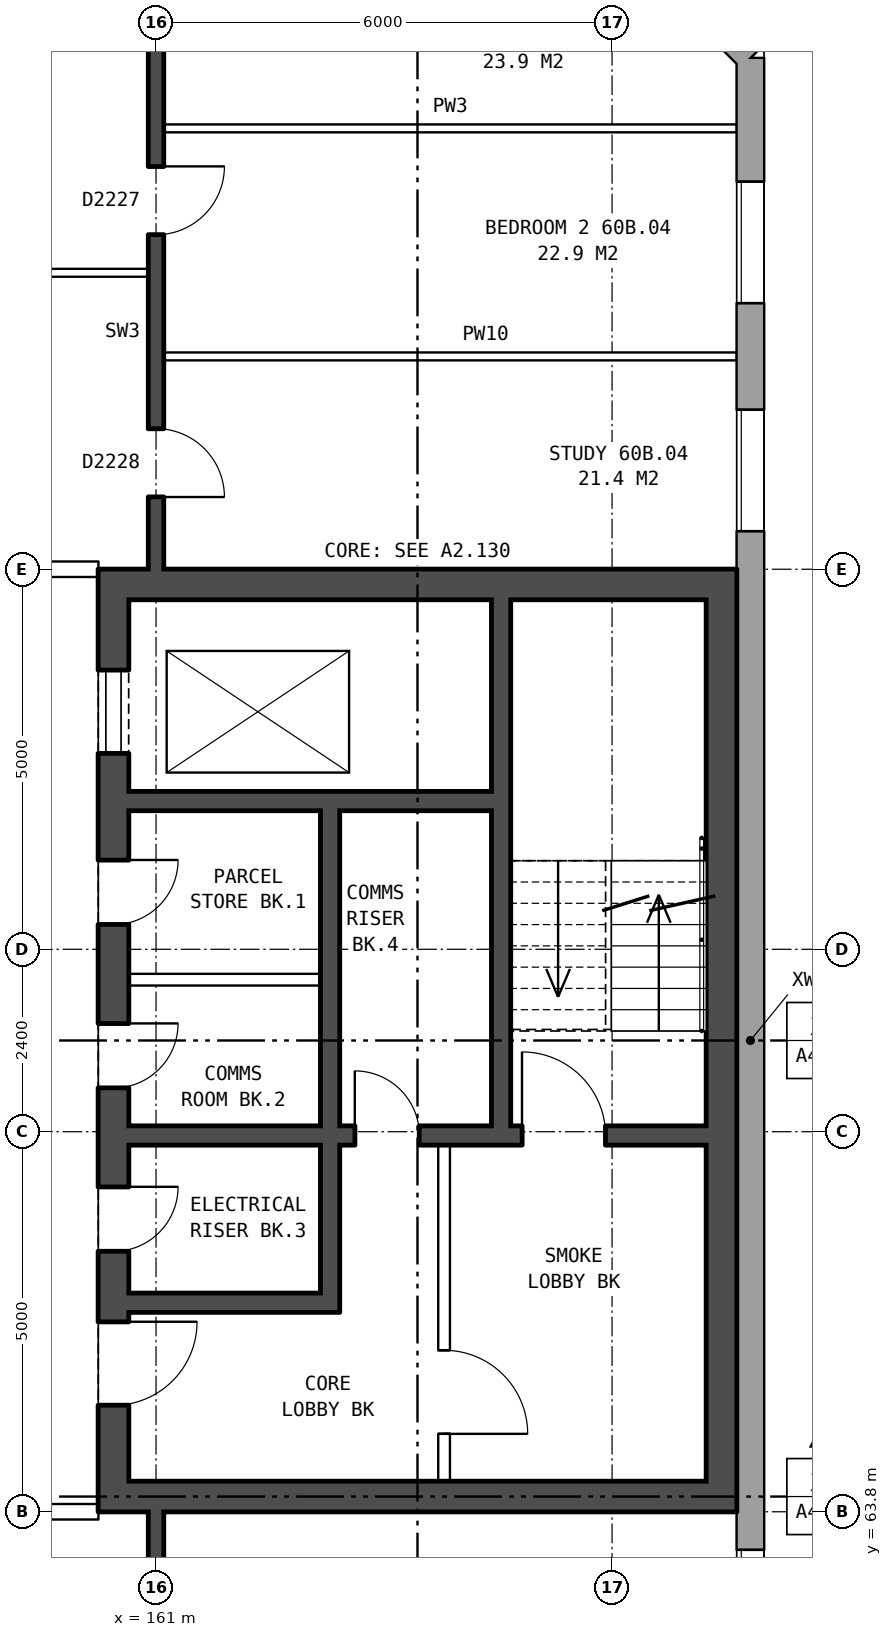
"""IFC4 building model, lengths in metres.
Left out: names, types, materials, properties, quantities, classifications, styles, units other than length and angle.
Written with IfcOpenShell. Run it as: python <this file> out.ifc"""

import sys

from ifc_helpers import new_model, si_unit, direction, frame, frame_2d, origin, place, context, subcontext, project, spatial, rectangle, extrude, element, fill, save


model = new_model("IFC4")
c1 = context("Model", 3, precision=1e-05, world=origin(), true_north=direction((0.0, 1.0)))
c2 = subcontext(c1, "Body", "Model", "MODEL_VIEW")
j1 = project(units=[si_unit("LENGTHUNIT", "METRE"), si_unit("PLANEANGLEUNIT", "RADIAN")], contexts=[c1])
p1 = place(None, origin())
s1 = spatial("IfcSite", under=j1, at=p1, CompositionType="ELEMENT")
p2 = place(p1, origin())
s2 = spatial("IfcBuilding", under=s1, at=p2, CompositionType="ELEMENT")
p3 = place(p2, frame((0.0, 0.0, 212.1)))
s3 = spatial("IfcBuildingStorey", under=s2, at=p3, CompositionType="ELEMENT", Elevation=212.1)
p4 = place(p3, frame((168.82, 57.075, 0.0), z_axis=(0.0, 0.0, 1.0), x_axis=(0.0, 1.0, 0.0)))
e1 = element("IfcWall", 1, at=p4, inside=s3, PredefinedType="STANDARD", context=c2, shape_type="SweptSolid", body=[
    extrude(rectangle(XDim=25.851, YDim=0.36, at=frame_2d((12.925, 0.0))), origin(), (0.0, 0.0, 1.0), 2.85),
])
p5 = place(p4, frame((1.625, 0.0, 0.8)))
e2 = element("IfcOpeningElement", 2, at=p5, cuts=e1, PredefinedType="OPENING", context=c2, shape_type="SweptSolid", body=[
    extrude(rectangle(XDim=1.6, YDim=1.8, at=frame_2d((0.8, 0.9))), frame((0.0, 0.19, 0.0), z_axis=(0.0, -1.0, 0.0), x_axis=(1.0, 0.0, 0.0)), (0.0, 0.0, 1.0), 0.38),
])
p6 = place(p4, frame((4.625, 0.0, 0.8)))
e3 = element("IfcOpeningElement", 3, at=p6, cuts=e1, PredefinedType="OPENING", context=c2, shape_type="SweptSolid", body=[
    extrude(rectangle(XDim=1.6, YDim=1.8, at=frame_2d((0.8, 0.9))), frame((0.0, 0.19, 0.0), z_axis=(0.0, -1.0, 0.0), x_axis=(1.0, 0.0, 0.0)), (0.0, 0.0, 1.0), 0.38),
])
p7 = place(p4, frame((19.625, 0.0, 0.8)))
e4 = element("IfcOpeningElement", 4, at=p7, cuts=e1, PredefinedType="OPENING", context=c2, shape_type="SweptSolid", body=[
    extrude(rectangle(XDim=1.6, YDim=1.8, at=frame_2d((0.8, 0.9))), frame((0.0, 0.19, 0.0), z_axis=(0.0, -1.0, 0.0), x_axis=(1.0, 0.0, 0.0)), (0.0, 0.0, 1.0), 0.38),
])
p8 = place(p4, frame((22.625, 0.0, 0.8)))
e5 = element("IfcOpeningElement", 5, at=p8, cuts=e1, PredefinedType="OPENING", context=c2, shape_type="SweptSolid", body=[
    extrude(rectangle(XDim=1.6, YDim=1.8, at=frame_2d((0.8, 0.9))), frame((0.0, 0.19, 0.0), z_axis=(0.0, -1.0, 0.0), x_axis=(1.0, 0.0, 0.0)), (0.0, 0.0, 1.0), 0.38),
])
p9 = place(p3, frame((168.82, 82.925, 0.0), z_axis=(0.0, 0.0, 1.0), x_axis=(-0.707106781187, 0.707106781187, 0.0)))
e6 = element("IfcWall", 6, at=p9, inside=s3, PredefinedType="STANDARD", context=c2, shape_type="SweptSolid", body=[
    extrude(rectangle(XDim=4.094, YDim=0.36, at=frame_2d((2.047, 0.0))), origin(), (0.0, 0.0, 1.0), 2.85),
])
p10 = place(p9, frame((1.247, 0.0, 0.8)))
e7 = element("IfcOpeningElement", 7, at=p10, cuts=e6, PredefinedType="OPENING", context=c2, shape_type="SweptSolid", body=[
    extrude(rectangle(XDim=1.6, YDim=1.8, at=frame_2d((0.8, 0.9))), frame((0.0, 0.19, 0.0), z_axis=(0.0, -1.0, 0.0), x_axis=(1.0, 0.0, 0.0)), (0.0, 0.0, 1.0), 0.38),
])
p11 = place(p3, frame((160.44, 76.2, 0.0), z_axis=(0.0, 0.0, 1.0), x_axis=(0.0, -1.0, 0.0)))
e8 = element("IfcWall", 8, at=p11, inside=s3, PredefinedType="SHEAR", context=c2, shape_type="SweptSolid", body=[
    extrude(rectangle(XDim=12.4, YDim=0.4, at=frame_2d((6.2, 0.0))), origin(), (0.0, 0.0, 1.0), 2.85),
])
p12 = place(p11, frame((1.325, 0.0, 0.0)))
e9 = element("IfcOpeningElement", 9, at=p12, cuts=e8, PredefinedType="OPENING", context=c2, shape_type="SweptSolid", body=[
    extrude(rectangle(XDim=1.1, YDim=2.1, at=frame_2d((0.55, 1.05))), frame((0.0, 0.21, 0.0), z_axis=(0.0, -1.0, 0.0), x_axis=(1.0, 0.0, 0.0)), (0.0, 0.0, 1.0), 0.42),
])
p13 = place(p11, frame((3.825, 0.0, 0.0)))
e10 = element("IfcOpeningElement", 10, at=p13, cuts=e8, PredefinedType="OPENING", context=c2, shape_type="SweptSolid", body=[
    extrude(rectangle(XDim=0.85, YDim=2.1, at=frame_2d((0.425, 1.05))), frame((0.0, 0.21, 0.0), z_axis=(0.0, -1.0, 0.0), x_axis=(1.0, 0.0, 0.0)), (0.0, 0.0, 1.0), 0.42),
])
p14 = place(p11, frame((5.975, 0.0, 0.0)))
e11 = element("IfcOpeningElement", 11, at=p14, cuts=e8, PredefinedType="OPENING", context=c2, shape_type="SweptSolid", body=[
    extrude(rectangle(XDim=0.85, YDim=2.1, at=frame_2d((0.425, 1.05))), frame((0.0, 0.21, 0.0), z_axis=(0.0, -1.0, 0.0), x_axis=(1.0, 0.0, 0.0)), (0.0, 0.0, 1.0), 0.42),
])
p15 = place(p11, frame((9.9, 0.0, 0.0)))
e12 = element("IfcOpeningElement", 12, at=p15, cuts=e8, PredefinedType="OPENING", context=c2, shape_type="SweptSolid", body=[
    extrude(rectangle(XDim=1.1, YDim=2.1, at=frame_2d((0.55, 1.05))), frame((0.0, 0.21, 0.0), z_axis=(0.0, -1.0, 0.0), x_axis=(1.0, 0.0, 0.0)), (0.0, 0.0, 1.0), 0.42),
])
p16 = place(p11, frame((8.125, 0.0, 0.0)))
e13 = element("IfcOpeningElement", 13, at=p16, cuts=e8, PredefinedType="OPENING", context=c2, shape_type="SweptSolid", body=[
    extrude(rectangle(XDim=0.85, YDim=2.1, at=frame_2d((0.425, 1.05))), frame((0.0, 0.21, 0.0), z_axis=(0.0, -1.0, 0.0), x_axis=(1.0, 0.0, 0.0)), (0.0, 0.0, 1.0), 0.42),
])
p17 = place(p3, frame((168.44, 76.2, 0.0), z_axis=(0.0, 0.0, 1.0), x_axis=(0.0, -1.0, 0.0)))
e14 = element("IfcWall", 14, at=p17, inside=s3, PredefinedType="SHEAR", context=c2, shape_type="SweptSolid", body=[
    extrude(rectangle(XDim=12.4, YDim=0.4, at=frame_2d((6.2, 0.0))), origin(), (0.0, 0.0, 1.0), 2.85),
])
for number, where, z_axis, x_axis in (
    (15, (160.64, 76.0, 0.0), (0.0, 0.0, 1.0), (1.0, 0.0, 0.0)),
    (16, (160.64, 64.0, 0.0), (0.0, 0.0, 1.0), (1.0, 0.0, 0.0)),
):
    element("IfcWall", number, at=place(p3, frame(where, z_axis=z_axis, x_axis=x_axis)), inside=s3, PredefinedType="SHEAR", context=c2, shape_type="SweptSolid", body=[
        extrude(rectangle(XDim=7.6, YDim=0.4, at=frame_2d((3.8, 0.0))), origin(), (0.0, 0.0, 1.0), 2.85),
    ])
p18 = place(p3, frame((160.64, 73.15, 0.0), z_axis=(0.0, 0.0, 1.0), x_axis=(1.0, 0.0, 0.0)))
e17 = element("IfcWall", 17, at=p18, inside=s3, PredefinedType="SHEAR", context=c2, shape_type="SweptSolid", body=[
    extrude(rectangle(XDim=4.775, YDim=0.25, at=frame_2d((2.388, 0.0))), origin(), (0.0, 0.0, 1.0), 2.85),
])
p19 = place(p3, frame((160.64, 70.8, 0.0), z_axis=(0.0, 0.0, 1.0), x_axis=(1.0, 0.0, 0.0)))
e18 = element("IfcWall", 18, at=p19, inside=s3, PredefinedType="PARTITIONING", context=c2, shape_type="SweptSolid", body=[
    extrude(rectangle(XDim=2.525, YDim=0.15, at=frame_2d((1.263, 0.0))), origin(), (0.0, 0.0, 1.0), 2.85),
])
p20 = place(p3, frame((160.64, 68.75, 0.0), z_axis=(0.0, 0.0, 1.0), x_axis=(1.0, 0.0, 0.0)))
e19 = element("IfcWall", 19, at=p20, inside=s3, PredefinedType="SHEAR", context=c2, shape_type="SweptSolid", body=[
    extrude(rectangle(XDim=7.6, YDim=0.25, at=frame_2d((3.8, 0.0))), origin(), (0.0, 0.0, 1.0), 2.85),
])
p21 = place(p20, frame((5.175, 0.0, 0.0)))
e20 = element("IfcOpeningElement", 20, at=p21, cuts=e19, PredefinedType="OPENING", context=c2, shape_type="SweptSolid", body=[
    extrude(rectangle(XDim=1.1, YDim=2.1, at=frame_2d((0.55, 1.05))), frame((0.0, 0.135, 0.0), z_axis=(0.0, -1.0, 0.0), x_axis=(1.0, 0.0, 0.0)), (0.0, 0.0, 1.0), 0.27),
])
p22 = place(p20, frame((2.975, 0.0, 0.0)))
e21 = element("IfcOpeningElement", 21, at=p22, cuts=e19, PredefinedType="OPENING", context=c2, shape_type="SweptSolid", body=[
    extrude(rectangle(XDim=0.85, YDim=2.1, at=frame_2d((0.425, 1.05))), frame((0.0, 0.135, 0.0), z_axis=(0.0, -1.0, 0.0), x_axis=(1.0, 0.0, 0.0)), (0.0, 0.0, 1.0), 0.27),
])
p23 = place(p3, frame((160.64, 66.55, 0.0), z_axis=(0.0, 0.0, 1.0), x_axis=(1.0, 0.0, 0.0)))
e22 = element("IfcWall", 22, at=p23, inside=s3, PredefinedType="SHEAR", context=c2, shape_type="SweptSolid", body=[
    extrude(rectangle(XDim=2.525, YDim=0.25, at=frame_2d((1.263, 0.0))), origin(), (0.0, 0.0, 1.0), 2.85),
])
p24 = place(p3, frame((163.29, 73.025, 0.0), z_axis=(0.0, 0.0, 1.0), x_axis=(0.0, -1.0, 0.0)))
e23 = element("IfcWall", 23, at=p24, inside=s3, PredefinedType="SHEAR", context=c2, shape_type="SweptSolid", body=[
    extrude(rectangle(XDim=4.15, YDim=0.25, at=frame_2d((2.075, 0.0))), origin(), (0.0, 0.0, 1.0), 2.85),
])
p25 = place(p3, frame((163.29, 68.625, 0.0), z_axis=(0.0, 0.0, 1.0), x_axis=(0.0, -1.0, 0.0)))
e24 = element("IfcWall", 24, at=p25, inside=s3, PredefinedType="SHEAR", context=c2, shape_type="SweptSolid", body=[
    extrude(rectangle(XDim=2.2, YDim=0.25, at=frame_2d((1.1, 0.0))), origin(), (0.0, 0.0, 1.0), 2.85),
])
p26 = place(p3, frame((164.79, 68.625, 0.0), z_axis=(0.0, 0.0, 1.0), x_axis=(0.0, -1.0, 0.0)))
e25 = element("IfcWall", 25, at=p26, inside=s3, PredefinedType="PARTITIONING", context=c2, shape_type="SweptSolid", body=[
    extrude(rectangle(XDim=4.425, YDim=0.15, at=frame_2d((2.212, 0.0))), origin(), (0.0, 0.0, 1.0), 2.85),
])
p27 = place(p26, frame((2.7, 0.0, 0.0)))
e26 = element("IfcOpeningElement", 26, at=p27, cuts=e25, PredefinedType="OPENING", context=c2, shape_type="SweptSolid", body=[
    extrude(rectangle(XDim=1.1, YDim=2.1, at=frame_2d((0.55, 1.05))), frame((0.0, 0.085, 0.0), z_axis=(0.0, -1.0, 0.0), x_axis=(1.0, 0.0, 0.0)), (0.0, 0.0, 1.0), 0.17),
])
p28 = place(p3, frame((165.54, 75.8, 0.0), z_axis=(0.0, 0.0, 1.0), x_axis=(0.0, -1.0, 0.0)))
e27 = element("IfcWall", 27, at=p28, inside=s3, PredefinedType="SHEAR", context=c2, shape_type="SweptSolid", body=[
    extrude(rectangle(XDim=6.925, YDim=0.25, at=frame_2d((3.462, 0.0))), origin(), (0.0, 0.0, 1.0), 2.85),
])
p29 = place(p3, frame((157.24, 63.8, 0.0), z_axis=(0.0, 0.0, 1.0), x_axis=(1.0, 0.0, 0.0)))
e28 = element("IfcWall", 28, at=p29, inside=s3, PredefinedType="PARTITIONING", context=c2, shape_type="SweptSolid", body=[
    extrude(rectangle(XDim=3.0, YDim=0.2, at=frame_2d((1.5, 0.0))), origin(), (0.0, 0.0, 1.0), 2.85),
])
p30 = place(p29, frame((1.0, 0.0, 0.0)))
e29 = element("IfcOpeningElement", 29, at=p30, cuts=e28, PredefinedType="OPENING", context=c2, shape_type="SweptSolid", body=[
    extrude(rectangle(XDim=1.0, YDim=2.1, at=frame_2d((0.5, 1.05))), frame((0.0, 0.11, 0.0), z_axis=(0.0, -1.0, 0.0), x_axis=(1.0, 0.0, 0.0)), (0.0, 0.0, 1.0), 0.22),
])
p31 = place(p3, frame((157.24, 76.2, 0.0), z_axis=(0.0, 0.0, 1.0), x_axis=(1.0, 0.0, 0.0)))
e30 = element("IfcWall", 30, at=p31, inside=s3, PredefinedType="PARTITIONING", context=c2, shape_type="SweptSolid", body=[
    extrude(rectangle(XDim=3.0, YDim=0.2, at=frame_2d((1.5, 0.0))), origin(), (0.0, 0.0, 1.0), 2.85),
])
p32 = place(p31, frame((1.0, 0.0, 0.0)))
e31 = element("IfcOpeningElement", 31, at=p32, cuts=e30, PredefinedType="OPENING", context=c2, shape_type="SweptSolid", body=[
    extrude(rectangle(XDim=1.0, YDim=2.1, at=frame_2d((0.5, 1.05))), frame((0.0, 0.11, 0.0), z_axis=(0.0, -1.0, 0.0), x_axis=(1.0, 0.0, 0.0)), (0.0, 0.0, 1.0), 0.22),
])
p33 = place(p3, frame((161.1, 79.0, 0.0), z_axis=(0.0, 0.0, 1.0), x_axis=(1.0, 0.0, 0.0)))
e32 = element("IfcWall", 32, at=p33, inside=s3, PredefinedType="PARTITIONING", context=c2, shape_type="SweptSolid", body=[
    extrude(rectangle(XDim=7.54, YDim=0.1, at=frame_2d((3.77, 0.0))), origin(), (0.0, 0.0, 1.0), 2.85),
])
p34 = place(p3, frame((155.1, 80.1, 0.0), z_axis=(0.0, 0.0, 1.0), x_axis=(1.0, 0.0, 0.0)))
e33 = element("IfcWall", 33, at=p34, inside=s3, PredefinedType="PARTITIONING", context=c2, shape_type="SweptSolid", body=[
    extrude(rectangle(XDim=5.8, YDim=0.1, at=frame_2d((2.9, 0.0))), origin(), (0.0, 0.0, 1.0), 2.85),
])
p35 = place(p34, frame((3.6, 0.0, 0.0)))
e34 = element("IfcOpeningElement", 34, at=p35, cuts=e33, PredefinedType="OPENING", context=c2, shape_type="SweptSolid", body=[
    extrude(rectangle(XDim=0.9, YDim=2.1, at=frame_2d((0.45, 1.05))), frame((0.0, 0.06, 0.0), z_axis=(0.0, -1.0, 0.0), x_axis=(1.0, 0.0, 0.0)), (0.0, 0.0, 1.0), 0.12),
])
p36 = place(p34, frame((0.7, 0.0, 0.0)))
e35 = element("IfcOpeningElement", 35, at=p36, cuts=e33, PredefinedType="OPENING", context=c2, shape_type="SweptSolid", body=[
    extrude(rectangle(XDim=0.9, YDim=2.1, at=frame_2d((0.45, 1.05))), frame((0.0, 0.06, 0.0), z_axis=(0.0, -1.0, 0.0), x_axis=(1.0, 0.0, 0.0)), (0.0, 0.0, 1.0), 0.12),
])
p37 = place(p3, frame((161.1, 82.0, 0.0), z_axis=(0.0, 0.0, 1.0), x_axis=(1.0, 0.0, 0.0)))
e36 = element("IfcWall", 36, at=p37, inside=s3, PredefinedType="PARTITIONING", context=c2, shape_type="SweptSolid", body=[
    extrude(rectangle(XDim=7.54, YDim=0.1, at=frame_2d((3.77, 0.0))), origin(), (0.0, 0.0, 1.0), 2.85),
])
p38 = place(p3, frame((161.0, 54.36, 0.0), z_axis=(0.0, 0.0, 1.0), x_axis=(0.0, 1.0, 0.0)))
e37 = element("IfcWall", 37, at=p38, inside=s3, PredefinedType="SOLIDWALL", context=c2, shape_type="SweptSolid", body=[
    extrude(rectangle(XDim=9.44, YDim=0.2, at=frame_2d((4.72, 0.0))), origin(), (0.0, 0.0, 1.0), 2.85),
])
p39 = place(p38, frame((1.37, 0.0, 0.0)))
e38 = element("IfcOpeningElement", 38, at=p39, cuts=e37, PredefinedType="OPENING", context=c2, shape_type="SweptSolid", body=[
    extrude(rectangle(XDim=0.9, YDim=2.1, at=frame_2d((0.45, 1.05))), frame((0.0, 0.11, 0.0), z_axis=(0.0, -1.0, 0.0), x_axis=(1.0, 0.0, 0.0)), (0.0, 0.0, 1.0), 0.22),
])
p40 = place(p38, frame((4.29, 0.0, 0.0)))
e39 = element("IfcOpeningElement", 39, at=p40, cuts=e37, PredefinedType="OPENING", context=c2, shape_type="SweptSolid", body=[
    extrude(rectangle(XDim=0.9, YDim=2.1, at=frame_2d((0.45, 1.05))), frame((0.0, 0.11, 0.0), z_axis=(0.0, -1.0, 0.0), x_axis=(1.0, 0.0, 0.0)), (0.0, 0.0, 1.0), 0.22),
])
p41 = place(p38, frame((7.59, 0.0, 0.0)))
e40 = element("IfcOpeningElement", 40, at=p41, cuts=e37, PredefinedType="OPENING", context=c2, shape_type="SweptSolid", body=[
    extrude(rectangle(XDim=0.9, YDim=2.1, at=frame_2d((0.45, 1.05))), frame((0.0, 0.11, 0.0), z_axis=(0.0, -1.0, 0.0), x_axis=(1.0, 0.0, 0.0)), (0.0, 0.0, 1.0), 0.22),
])
p42 = place(p3, frame((161.0, 76.2, 0.0), z_axis=(0.0, 0.0, 1.0), x_axis=(0.0, 1.0, 0.0)))
e41 = element("IfcWall", 41, at=p42, inside=s3, PredefinedType="SOLIDWALL", context=c2, shape_type="SweptSolid", body=[
    extrude(rectangle(XDim=9.44, YDim=0.2, at=frame_2d((4.72, 0.0))), origin(), (0.0, 0.0, 1.0), 2.85),
])
p43 = place(p42, frame((7.17, 0.0, 0.0)))
e42 = element("IfcOpeningElement", 42, at=p43, cuts=e41, PredefinedType="OPENING", context=c2, shape_type="SweptSolid", body=[
    extrude(rectangle(XDim=0.9, YDim=2.1, at=frame_2d((0.45, 1.05))), frame((0.0, 0.11, 0.0), z_axis=(0.0, -1.0, 0.0), x_axis=(1.0, 0.0, 0.0)), (0.0, 0.0, 1.0), 0.22),
])
p44 = place(p42, frame((4.4, 0.0, 0.0)))
e43 = element("IfcOpeningElement", 43, at=p44, cuts=e41, PredefinedType="OPENING", context=c2, shape_type="SweptSolid", body=[
    extrude(rectangle(XDim=0.9, YDim=2.1, at=frame_2d((0.45, 1.05))), frame((0.0, 0.11, 0.0), z_axis=(0.0, -1.0, 0.0), x_axis=(1.0, 0.0, 0.0)), (0.0, 0.0, 1.0), 0.22),
])
p45 = place(p42, frame((0.95, 0.0, 0.0)))
e44 = element("IfcOpeningElement", 44, at=p45, cuts=e41, PredefinedType="OPENING", context=c2, shape_type="SweptSolid", body=[
    extrude(rectangle(XDim=0.9, YDim=2.1, at=frame_2d((0.45, 1.05))), frame((0.0, 0.11, 0.0), z_axis=(0.0, -1.0, 0.0), x_axis=(1.0, 0.0, 0.0)), (0.0, 0.0, 1.0), 0.22),
])
p46 = place(p6, origin())
e45 = element("IfcWindow", 45, at=p46, inside=s3, PartitioningType="SINGLE_PANEL", PredefinedType="WINDOW", context=c2, shape_type="SweptSolid", body=[
    extrude(rectangle(XDim=1.6, YDim=1.8, at=frame_2d((0.8, 0.9))), frame((0.0, 0.15, 0.0), z_axis=(0.0, -1.0, 0.0), x_axis=(1.0, 0.0, 0.0)), (0.0, 0.0, 1.0), 0.06),
])
fill(e3, e45)
p47 = place(p7, origin())
e46 = element("IfcWindow", 46, at=p47, inside=s3, PartitioningType="SINGLE_PANEL", PredefinedType="WINDOW", context=c2, shape_type="SweptSolid", body=[
    extrude(rectangle(XDim=1.6, YDim=1.8, at=frame_2d((0.8, 0.9))), frame((0.0, 0.15, 0.0), z_axis=(0.0, -1.0, 0.0), x_axis=(1.0, 0.0, 0.0)), (0.0, 0.0, 1.0), 0.06),
])
fill(e4, e46)
p48 = place(p8, origin())
e47 = element("IfcWindow", 47, at=p48, inside=s3, PartitioningType="SINGLE_PANEL", PredefinedType="WINDOW", context=c2, shape_type="SweptSolid", body=[
    extrude(rectangle(XDim=1.6, YDim=1.8, at=frame_2d((0.8, 0.9))), frame((0.0, 0.15, 0.0), z_axis=(0.0, -1.0, 0.0), x_axis=(1.0, 0.0, 0.0)), (0.0, 0.0, 1.0), 0.06),
])
fill(e5, e47)
p49 = place(p12, origin())
e48 = element("IfcDoor", 48, at=p49, inside=s3, OperationType="DOUBLE_DOOR_SLIDING", PredefinedType="DOOR", context=c2, shape_type="SweptSolid", body=[
    extrude(rectangle(XDim=1.1, YDim=2.1, at=frame_2d((0.55, 1.05))), frame((0.0, 0.185, 0.0), z_axis=(0.0, -1.0, 0.0), x_axis=(1.0, 0.0, 0.0)), (0.0, 0.0, 1.0), 0.05),
])
fill(e9, e48)
p50 = place(p13, origin())
e49 = element("IfcDoor", 49, at=p50, inside=s3, OperationType="SINGLE_SWING_LEFT", PredefinedType="DOOR", context=c2, shape_type="SweptSolid", body=[
    extrude(rectangle(XDim=0.85, YDim=2.1, at=frame_2d((0.425, 1.05))), frame((0.0, 0.185, 0.0), z_axis=(0.0, -1.0, 0.0), x_axis=(1.0, 0.0, 0.0)), (0.0, 0.0, 1.0), 0.05),
])
fill(e10, e49)
p51 = place(p14, origin())
e50 = element("IfcDoor", 50, at=p51, inside=s3, OperationType="SINGLE_SWING_LEFT", PredefinedType="DOOR", context=c2, shape_type="SweptSolid", body=[
    extrude(rectangle(XDim=0.85, YDim=2.1, at=frame_2d((0.425, 1.05))), frame((0.0, 0.185, 0.0), z_axis=(0.0, -1.0, 0.0), x_axis=(1.0, 0.0, 0.0)), (0.0, 0.0, 1.0), 0.05),
])
fill(e11, e50)
p52 = place(p15, origin())
e51 = element("IfcDoor", 51, at=p52, inside=s3, OperationType="SINGLE_SWING_LEFT", PredefinedType="DOOR", context=c2, shape_type="SweptSolid", body=[
    extrude(rectangle(XDim=1.1, YDim=2.1, at=frame_2d((0.55, 1.05))), frame((0.0, 0.185, 0.0), z_axis=(0.0, -1.0, 0.0), x_axis=(1.0, 0.0, 0.0)), (0.0, 0.0, 1.0), 0.05),
])
fill(e12, e51)
p53 = place(p27, origin())
e52 = element("IfcDoor", 52, at=p53, inside=s3, OperationType="SINGLE_SWING_RIGHT", PredefinedType="DOOR", context=c2, shape_type="SweptSolid", body=[
    extrude(rectangle(XDim=1.1, YDim=2.1, at=frame_2d((0.55, 1.05))), frame((0.0, 0.025, 0.0), z_axis=(0.0, -1.0, 0.0), x_axis=(1.0, 0.0, 0.0)), (0.0, 0.0, 1.0), 0.05),
])
fill(e26, e52)
p54 = place(p21, origin())
e53 = element("IfcDoor", 53, at=p54, inside=s3, OperationType="SINGLE_SWING_LEFT", PredefinedType="DOOR", context=c2, shape_type="SweptSolid", body=[
    extrude(rectangle(XDim=1.1, YDim=2.1, at=frame_2d((0.55, 1.05))), frame((0.0, 0.025, 0.0), z_axis=(0.0, -1.0, 0.0), x_axis=(1.0, 0.0, 0.0)), (0.0, 0.0, 1.0), 0.05),
])
fill(e20, e53)
p55 = place(p16, origin())
e54 = element("IfcDoor", 54, at=p55, inside=s3, OperationType="SINGLE_SWING_LEFT", PredefinedType="DOOR", context=c2, shape_type="SweptSolid", body=[
    extrude(rectangle(XDim=0.85, YDim=2.1, at=frame_2d((0.425, 1.05))), frame((0.0, 0.185, 0.0), z_axis=(0.0, -1.0, 0.0), x_axis=(1.0, 0.0, 0.0)), (0.0, 0.0, 1.0), 0.05),
])
fill(e13, e54)
p56 = place(p22, origin())
e55 = element("IfcDoor", 55, at=p56, inside=s3, OperationType="SINGLE_SWING_LEFT", PredefinedType="DOOR", context=c2, shape_type="SweptSolid", body=[
    extrude(rectangle(XDim=0.85, YDim=2.1, at=frame_2d((0.425, 1.05))), frame((0.0, 0.025, 0.0), z_axis=(0.0, -1.0, 0.0), x_axis=(1.0, 0.0, 0.0)), (0.0, 0.0, 1.0), 0.05),
])
fill(e21, e55)
p57 = place(p44, frame((0.9, 0.0, 0.0), z_axis=(0.0, 0.0, 1.0), x_axis=(-1.0, 0.0, 0.0)))
e56 = element("IfcDoor", 56, at=p57, inside=s3, OperationType="SINGLE_SWING_LEFT", PredefinedType="DOOR", context=c2, shape_type="SweptSolid", body=[
    extrude(rectangle(XDim=0.9, YDim=2.1, at=frame_2d((0.45, 1.05))), frame((0.0, 0.025, 0.0), z_axis=(0.0, -1.0, 0.0), x_axis=(1.0, 0.0, 0.0)), (0.0, 0.0, 1.0), 0.05),
])
fill(e43, e56)
p58 = place(p45, frame((0.9, 0.0, 0.0), z_axis=(0.0, 0.0, 1.0), x_axis=(-1.0, 0.0, 0.0)))
e57 = element("IfcDoor", 57, at=p58, inside=s3, OperationType="SINGLE_SWING_RIGHT", PredefinedType="DOOR", context=c2, shape_type="SweptSolid", body=[
    extrude(rectangle(XDim=0.9, YDim=2.1, at=frame_2d((0.45, 1.05))), frame((0.0, 0.025, 0.0), z_axis=(0.0, -1.0, 0.0), x_axis=(1.0, 0.0, 0.0)), (0.0, 0.0, 1.0), 0.05),
])
fill(e44, e57)
save(model, sys.argv[1])
